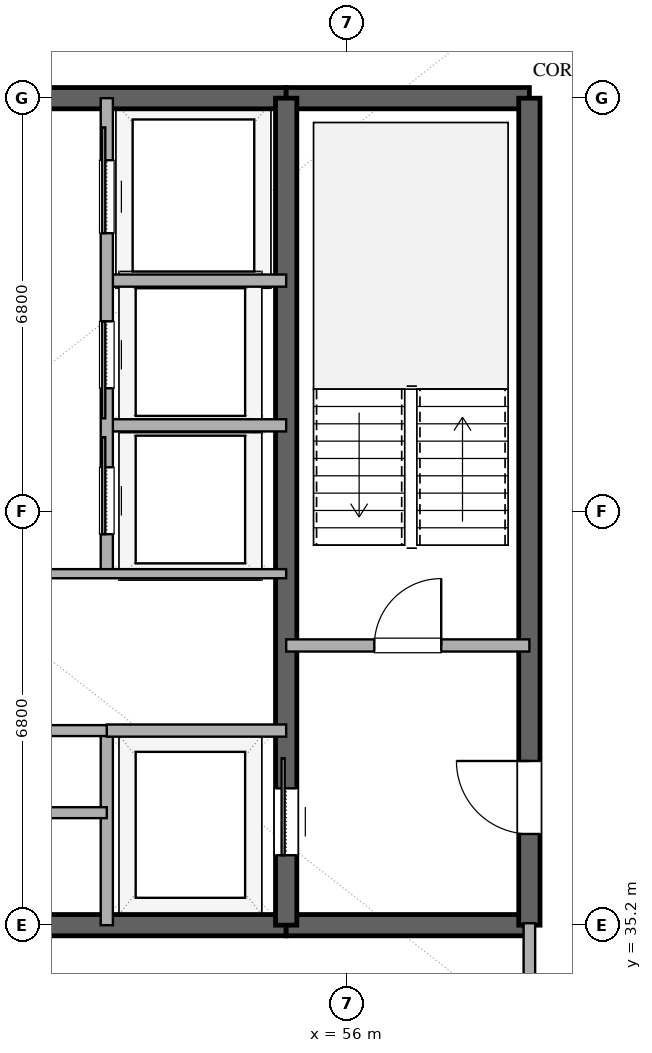
"""IFC4 building model, lengths in metres.
Left out: names, types, materials, properties, quantities, classifications, styles, units other than length and angle.
Written with IfcOpenShell. Run it as: python <this file> out.ifc"""

import sys

from ifc_helpers import new_model, si_unit, direction, frame, frame_2d, origin, place, context, subcontext, project, spatial, rectangle, extrude, element, fill, save


model = new_model("IFC4")
c1 = context("Model", 3, precision=1e-05, world=origin(), true_north=direction((0.0, 1.0)))
c2 = subcontext(c1, "Body", "Model", "MODEL_VIEW")
j1 = project(units=[si_unit("LENGTHUNIT", "METRE"), si_unit("PLANEANGLEUNIT", "RADIAN")], contexts=[c1])
p1 = place(None, origin())
s1 = spatial("IfcSite", under=j1, at=p1, CompositionType="ELEMENT")
p2 = place(p1, origin())
s2 = spatial("IfcBuilding", under=s1, at=p2, CompositionType="ELEMENT")
p3 = place(p2, frame((0.0, 0.0, 309.0)))
s3 = spatial("IfcBuildingStorey", under=s2, at=p3, CompositionType="ELEMENT", Elevation=309.0)
p4 = place(p3, frame((41.0, 35.2, 0.0), z_axis=(0.0, 0.0, 1.0), x_axis=(1.0, 0.0, 0.0)))
e1 = element("IfcWall", 1, at=p4, inside=s3, PredefinedType="SHEAR", context=c2, shape_type="SweptSolid", body=[
    extrude(rectangle(XDim=14.0, YDim=0.35, at=frame_2d((7.0, 0.0))), origin(), (0.0, 0.0, 1.0), 3.37),
])
p5 = place(p4, frame((6.1, 0.0, 0.0)))
e2 = element("IfcOpeningElement", 2, at=p5, cuts=e1, PredefinedType="OPENING", context=c2, shape_type="SweptSolid", body=[
    extrude(rectangle(XDim=1.8, YDim=2.25, at=frame_2d((0.9, 1.125))), frame((0.0, 0.185, 0.0), z_axis=(0.0, -1.0, 0.0), x_axis=(1.0, 0.0, 0.0)), (0.0, 0.0, 1.0), 0.37),
])
p6 = place(p3, frame((55.0, 35.2, 0.0), z_axis=(0.0, 0.0, 1.0), x_axis=(1.0, 0.0, 0.0)))
e3 = element("IfcWall", 3, at=p6, inside=s3, PredefinedType="SHEAR", context=c2, shape_type="SweptSolid", body=[
    extrude(rectangle(XDim=4.0, YDim=0.35, at=frame_2d((2.0, 0.0))), origin(), (0.0, 0.0, 1.0), 3.37),
])
p7 = place(p3, frame((41.0, 48.8, 0.0), z_axis=(0.0, 0.0, 1.0), x_axis=(1.0, 0.0, 0.0)))
e4 = element("IfcWall", 4, at=p7, inside=s3, PredefinedType="SHEAR", context=c2, shape_type="SweptSolid", body=[
    extrude(rectangle(XDim=14.0, YDim=0.35, at=frame_2d((7.0, 0.0))), origin(), (0.0, 0.0, 1.0), 3.37),
])
p8 = place(p7, frame((6.1, 0.0, 0.0)))
e5 = element("IfcOpeningElement", 5, at=p8, cuts=e4, PredefinedType="OPENING", context=c2, shape_type="SweptSolid", body=[
    extrude(rectangle(XDim=1.8, YDim=2.25, at=frame_2d((0.9, 1.125))), frame((0.0, 0.185, 0.0), z_axis=(0.0, -1.0, 0.0), x_axis=(1.0, 0.0, 0.0)), (0.0, 0.0, 1.0), 0.37),
])
p9 = place(p3, frame((55.0, 48.8, 0.0), z_axis=(0.0, 0.0, 1.0), x_axis=(1.0, 0.0, 0.0)))
e6 = element("IfcWall", 6, at=p9, inside=s3, PredefinedType="SHEAR", context=c2, shape_type="SweptSolid", body=[
    extrude(rectangle(XDim=4.0, YDim=0.35, at=frame_2d((2.0, 0.0))), origin(), (0.0, 0.0, 1.0), 3.37),
])
p10 = place(p3, frame((59.0, 35.2, 0.0), z_axis=(0.0, 0.0, 1.0), x_axis=(0.0, 1.0, 0.0)))
e7 = element("IfcWall", 7, at=p10, inside=s3, PredefinedType="SHEAR", context=c2, shape_type="SweptSolid", body=[
    extrude(rectangle(XDim=13.6, YDim=0.35, at=frame_2d((6.8, 0.0))), origin(), (0.0, 0.0, 1.0), 3.37),
])
p11 = place(p10, frame((1.5, 0.0, 0.0)))
e8 = element("IfcOpeningElement", 8, at=p11, cuts=e7, PredefinedType="OPENING", context=c2, shape_type="SweptSolid", body=[
    extrude(rectangle(XDim=1.2, YDim=2.15, at=frame_2d((0.6, 1.075))), frame((0.0, 0.185, 0.0), z_axis=(0.0, -1.0, 0.0), x_axis=(1.0, 0.0, 0.0)), (0.0, 0.0, 1.0), 0.37),
])
p12 = place(p3, frame((55.0, 35.2, 0.0), z_axis=(0.0, 0.0, 1.0), x_axis=(0.0, 1.0, 0.0)))
e9 = element("IfcWall", 9, at=p12, inside=s3, PredefinedType="SHEAR", context=c2, shape_type="SweptSolid", body=[
    extrude(rectangle(XDim=13.6, YDim=0.35, at=frame_2d((6.8, 0.0))), origin(), (0.0, 0.0, 1.0), 3.37),
])
p13 = place(p12, frame((1.15, 0.0, 0.0)))
e10 = element("IfcOpeningElement", 10, at=p13, cuts=e9, PredefinedType="OPENING", context=c2, shape_type="SweptSolid", body=[
    extrude(rectangle(XDim=1.1, YDim=2.2, at=frame_2d((0.55, 1.1))), frame((0.0, 0.185, 0.0), z_axis=(0.0, -1.0, 0.0), x_axis=(1.0, 0.0, 0.0)), (0.0, 0.0, 1.0), 0.37),
])
p14 = place(p3, frame((55.0, 39.8, 0.0), z_axis=(0.0, 0.0, 1.0), x_axis=(1.0, 0.0, 0.0)))
e11 = element("IfcWall", 11, at=p14, inside=s3, PredefinedType="SOLIDWALL", context=c2, shape_type="SweptSolid", body=[
    extrude(rectangle(XDim=4.0, YDim=0.2, at=frame_2d((2.0, 0.0))), origin(), (0.0, 0.0, 1.0), 2.73),
])
p15 = place(p14, frame((1.45, 0.0, 0.0)))
e12 = element("IfcOpeningElement", 12, at=p15, cuts=e11, PredefinedType="OPENING", context=c2, shape_type="SweptSolid", body=[
    extrude(rectangle(XDim=1.1, YDim=2.15, at=frame_2d((0.55, 1.075))), frame((0.0, 0.11, 0.0), z_axis=(0.0, -1.0, 0.0), x_axis=(1.0, 0.0, 0.0)), (0.0, 0.0, 1.0), 0.22),
])
p16 = place(p3, frame((52.05, 35.2, 0.0), z_axis=(0.0, 0.0, 1.0), x_axis=(0.0, 1.0, 0.0)))
e13 = element("IfcWall", 13, at=p16, inside=s3, PredefinedType="SOLIDWALL", context=c2, shape_type="SweptSolid", body=[
    extrude(rectangle(XDim=3.2, YDim=0.2, at=frame_2d((1.6, 0.0))), origin(), (0.0, 0.0, 1.0), 2.73),
])
for number, where, z_axis, x_axis in (
    (14, (52.05, 38.4, 0.0), (0.0, 0.0, 1.0), (1.0, 0.0, 0.0)),
    (15, (52.05, 43.42, 0.0), (0.0, 0.0, 1.0), (1.0, 0.0, 0.0)),
    (16, (52.05, 45.8, 0.0), (0.0, 0.0, 1.0), (1.0, 0.0, 0.0)),
):
    element("IfcWall", number, at=place(p3, frame(where, z_axis=z_axis, x_axis=x_axis)), inside=s3, PredefinedType="SOLIDWALL", context=c2, shape_type="SweptSolid", body=[
        extrude(rectangle(XDim=2.95, YDim=0.2, at=frame_2d((1.475, 0.0))), origin(), (0.0, 0.0, 1.0), 2.73),
    ])
p17 = place(p3, frame((52.05, 40.98, 0.0), z_axis=(0.0, 0.0, 1.0), x_axis=(0.0, 1.0, 0.0)))
e17 = element("IfcWall", 17, at=p17, inside=s3, PredefinedType="SOLIDWALL", context=c2, shape_type="SweptSolid", body=[
    extrude(rectangle(XDim=7.82, YDim=0.2, at=frame_2d((3.91, 0.0))), origin(), (0.0, 0.0, 1.0), 2.73),
])
p18 = place(p17, frame((0.65, 0.0, 0.0)))
e18 = element("IfcOpeningElement", 18, at=p18, cuts=e17, PredefinedType="OPENING", context=c2, shape_type="SweptSolid", body=[
    extrude(rectangle(XDim=1.1, YDim=2.2, at=frame_2d((0.55, 1.1))), frame((0.0, 0.11, 0.0), z_axis=(0.0, -1.0, 0.0), x_axis=(1.0, 0.0, 0.0)), (0.0, 0.0, 1.0), 0.22),
])
p19 = place(p17, frame((3.05, 0.0, 0.0)))
e19 = element("IfcOpeningElement", 19, at=p19, cuts=e17, PredefinedType="OPENING", context=c2, shape_type="SweptSolid", body=[
    extrude(rectangle(XDim=1.1, YDim=2.2, at=frame_2d((0.55, 1.1))), frame((0.0, 0.11, 0.0), z_axis=(0.0, -1.0, 0.0), x_axis=(1.0, 0.0, 0.0)), (0.0, 0.0, 1.0), 0.22),
])
p20 = place(p17, frame((5.6, 0.0, 0.0)))
e20 = element("IfcOpeningElement", 20, at=p20, cuts=e17, PredefinedType="OPENING", context=c2, shape_type="SweptSolid", body=[
    extrude(rectangle(XDim=1.2, YDim=2.2, at=frame_2d((0.6, 1.1))), frame((0.0, 0.11, 0.0), z_axis=(0.0, -1.0, 0.0), x_axis=(1.0, 0.0, 0.0)), (0.0, 0.0, 1.0), 0.22),
])
p21 = place(p3, frame((49.5, 40.98, 0.0), z_axis=(0.0, 0.0, 1.0), x_axis=(1.0, 0.0, 0.0)))
e21 = element("IfcWall", 21, at=p21, inside=s3, PredefinedType="PARTITIONING", context=c2, shape_type="SweptSolid", body=[
    extrude(rectangle(XDim=5.5, YDim=0.15, at=frame_2d((2.75, 0.0))), origin(), (0.0, 0.0, 1.0), 2.73),
])
for number, where, z_axis, x_axis in (
    (22, (49.2, 37.05, 0.0), (0.0, 0.0, 1.0), (1.0, 0.0, 0.0)),
    (23, (49.2, 38.4, 0.0), (0.0, 0.0, 1.0), (1.0, 0.0, 0.0)),
):
    element("IfcWall", number, at=place(p3, frame(where, z_axis=z_axis, x_axis=x_axis)), inside=s3, PredefinedType="PLUMBINGWALL", context=c2, shape_type="SweptSolid", body=[
        extrude(rectangle(XDim=2.85, YDim=0.18, at=frame_2d((1.425, 0.0))), origin(), (0.0, 0.0, 1.0), 2.73),
    ])
p22 = place(p3, frame((59.0, 34.0, 0.0), z_axis=(0.0, 0.0, 1.0), x_axis=(0.0, 1.0, 0.0)))
e24 = element("IfcWall", 24, at=p22, inside=s3, PredefinedType="PARTITIONING", context=c2, shape_type="SweptSolid", body=[
    extrude(rectangle(XDim=1.232, YDim=0.19, at=frame_2d((0.616, 0.0))), origin(), (0.0, 0.0, 1.0), 2.73),
])
p23 = place(p13, origin())
e25 = element("IfcDoor", 25, at=p23, inside=s3, OperationType="SLIDING_TO_RIGHT", PredefinedType="DOOR", context=c2, shape_type="SweptSolid", body=[
    extrude(rectangle(XDim=1.1, YDim=2.2, at=frame_2d((0.55, 1.1))), frame((0.0, 0.025, 0.0), z_axis=(0.0, -1.0, 0.0), x_axis=(1.0, 0.0, 0.0)), (0.0, 0.0, 1.0), 0.05),
])
fill(e10, e25)
p24 = place(p11, origin())
e26 = element("IfcDoor", 26, at=p24, inside=s3, OperationType="SINGLE_SWING_RIGHT", PredefinedType="DOOR", context=c2, shape_type="SweptSolid", body=[
    extrude(rectangle(XDim=1.2, YDim=2.15, at=frame_2d((0.6, 1.075))), frame((0.0, 0.025, 0.0), z_axis=(0.0, -1.0, 0.0), x_axis=(1.0, 0.0, 0.0)), (0.0, 0.0, 1.0), 0.05),
])
fill(e8, e26)
p25 = place(p15, origin())
e27 = element("IfcDoor", 27, at=p25, inside=s3, OperationType="SINGLE_SWING_RIGHT", PredefinedType="DOOR", context=c2, shape_type="SweptSolid", body=[
    extrude(rectangle(XDim=1.1, YDim=2.15, at=frame_2d((0.55, 1.075))), frame((0.0, 0.025, 0.0), z_axis=(0.0, -1.0, 0.0), x_axis=(1.0, 0.0, 0.0)), (0.0, 0.0, 1.0), 0.05),
])
fill(e12, e27)
p26 = place(p18, origin())
e28 = element("IfcDoor", 28, at=p26, inside=s3, OperationType="SLIDING_TO_RIGHT", PredefinedType="DOOR", context=c2, shape_type="SweptSolid", body=[
    extrude(rectangle(XDim=1.1, YDim=2.2, at=frame_2d((0.55, 1.1))), frame((0.0, 0.025, 0.0), z_axis=(0.0, -1.0, 0.0), x_axis=(1.0, 0.0, 0.0)), (0.0, 0.0, 1.0), 0.05),
])
fill(e18, e28)
p27 = place(p19, origin())
e29 = element("IfcDoor", 29, at=p27, inside=s3, OperationType="SLIDING_TO_LEFT", PredefinedType="DOOR", context=c2, shape_type="SweptSolid", body=[
    extrude(rectangle(XDim=1.1, YDim=2.2, at=frame_2d((0.55, 1.1))), frame((0.0, 0.025, 0.0), z_axis=(0.0, -1.0, 0.0), x_axis=(1.0, 0.0, 0.0)), (0.0, 0.0, 1.0), 0.05),
])
fill(e19, e29)
p28 = place(p20, origin())
e30 = element("IfcDoor", 30, at=p28, inside=s3, OperationType="SLIDING_TO_RIGHT", PredefinedType="DOOR", context=c2, shape_type="SweptSolid", body=[
    extrude(rectangle(XDim=1.2, YDim=2.2, at=frame_2d((0.6, 1.1))), frame((0.0, 0.025, 0.0), z_axis=(0.0, -1.0, 0.0), x_axis=(1.0, 0.0, 0.0)), (0.0, 0.0, 1.0), 0.05),
])
fill(e20, e30)
save(model, sys.argv[1])
